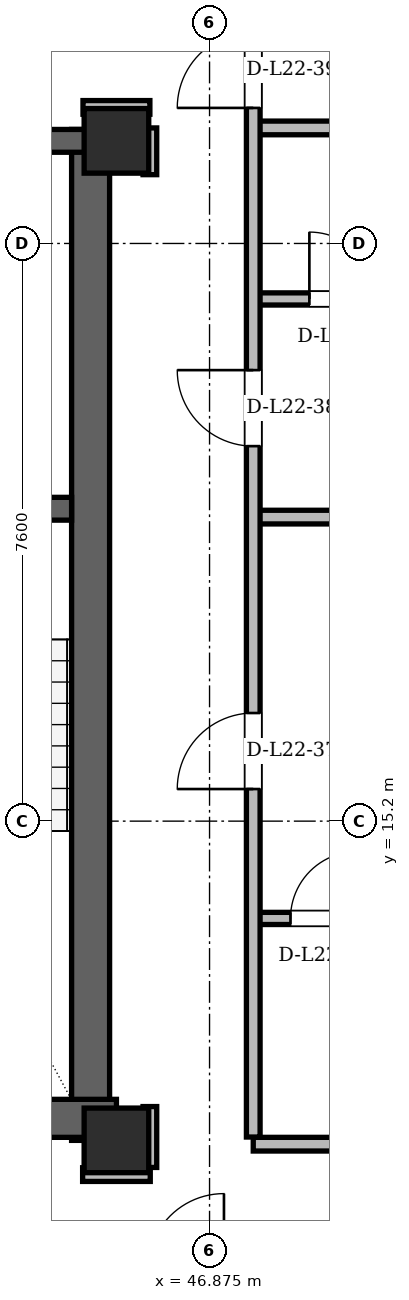
"""IFC4 building model, lengths in metres.
Left out: names, types, materials, properties, quantities, classifications, styles, units other than length and angle.
Written with IfcOpenShell. Run it as: python <this file> out.ifc"""

import sys

from ifc_helpers import new_model, si_unit, direction, frame, frame_2d, origin, origin_2d, place, context, subcontext, project, spatial, rectangle, hollow_rectangle, extrude, element, fill, save


model = new_model("IFC4")
c1 = context("Model", 3, precision=1e-05, world=origin(), true_north=direction((0.0, 1.0)))
c2 = subcontext(c1, "Body", "Model", "MODEL_VIEW")
j1 = project(units=[si_unit("LENGTHUNIT", "METRE"), si_unit("PLANEANGLEUNIT", "RADIAN")], contexts=[c1])
p1 = place(None, origin())
s1 = spatial("IfcSite", under=j1, at=p1, CompositionType="ELEMENT")
p2 = place(p1, origin())
s2 = spatial("IfcBuilding", under=s1, at=p2, CompositionType="ELEMENT")
p3 = place(p2, frame((0.0, 0.0, 86.1)))
s3 = spatial("IfcBuildingStorey", under=s2, at=p3, CompositionType="ELEMENT", Elevation=86.1)
for number, where, z_axis, x_axis in (
    (1, (45.65, 11.0, 0.0), (0.0, 0.0, 1.0), (1.0, 0.0, 0.0)),
    (2, (45.65, 24.15, 0.0), (0.0, 0.0, 1.0), (1.0, 0.0, 0.0)),
):
    element("IfcColumn", number, at=place(p3, frame(where, z_axis=z_axis, x_axis=x_axis)), inside=s3, PredefinedType="COLUMN", context=c2, shape_type="SweptSolid", body=[
        extrude(hollow_rectangle(XDim=0.85, YDim=0.85, WallThickness=0.07, at=origin_2d()), origin(), (0.0, 0.0, 1.0), 3.6),
    ])
p4 = place(p3, frame((45.31, 11.0, 0.0), z_axis=(0.0, 0.0, 1.0), x_axis=(0.0, 1.0, 0.0)))
e3 = element("IfcWall", 3, at=p4, inside=s3, PredefinedType="SHEAR", context=c2, shape_type="SweptSolid", body=[
    extrude(rectangle(XDim=13.3, YDim=0.5, at=frame_2d((6.65, 0.0))), origin(), (0.0, 0.0, 1.0), 3.36),
])
p5 = place(p3, frame((38.55, 11.29, 0.0), z_axis=(0.0, 0.0, 1.0), x_axis=(1.0, 0.0, 0.0)))
e4 = element("IfcWall", 4, at=p5, inside=s3, PredefinedType="SHEAR", context=c2, shape_type="SweptSolid", body=[
    extrude(rectangle(XDim=7.1, YDim=0.5, at=frame_2d((3.55, 0.0))), origin(), (0.0, 0.0, 1.0), 3.36),
])
p6 = place(p3, frame((29.65, 24.15, 0.0), z_axis=(0.0, 0.0, 1.0), x_axis=(1.0, 0.0, 0.0)))
e5 = element("IfcWall", 5, at=p6, inside=s3, PredefinedType="SHEAR", context=c2, shape_type="SweptSolid", body=[
    extrude(rectangle(XDim=15.7, YDim=0.3, at=frame_2d((7.85, 0.0))), origin(), (0.0, 0.0, 1.0), 3.36),
])
p7 = place(p6, frame((1.7, 0.0, 0.0)))
e6 = element("IfcOpeningElement", 6, at=p7, cuts=e5, PredefinedType="OPENING", context=c2, shape_type="SweptSolid", body=[
    extrude(rectangle(XDim=1.2, YDim=2.2, at=frame_2d((0.6, 1.1))), frame((0.0, 0.15, 0.0), z_axis=(0.0, -1.0, 0.0), x_axis=(1.0, 0.0, 0.0)), (0.0, 0.0, 1.0), 0.3),
])
p8 = place(p6, frame((12.8, 0.0, 0.0)))
e7 = element("IfcOpeningElement", 7, at=p8, cuts=e5, PredefinedType="OPENING", context=c2, shape_type="SweptSolid", body=[
    extrude(rectangle(XDim=1.2, YDim=2.2, at=frame_2d((0.6, 1.1))), frame((0.0, 0.15, 0.0), z_axis=(0.0, -1.0, 0.0), x_axis=(1.0, 0.0, 0.0)), (0.0, 0.0, 1.0), 0.3),
])
p9 = place(p6, frame((6.55, 0.0, 0.0)))
e8 = element("IfcOpeningElement", 8, at=p9, cuts=e5, PredefinedType="OPENING", context=c2, shape_type="SweptSolid", body=[
    extrude(rectangle(XDim=0.9, YDim=2.05, at=frame_2d((0.45, 1.025))), frame((0.0, 0.15, 0.0), z_axis=(0.0, -1.0, 0.0), x_axis=(1.0, 0.0, 0.0)), (0.0, 0.0, 1.0), 0.3),
])
p10 = place(p6, frame((8.45, 0.0, 0.0)))
e9 = element("IfcOpeningElement", 9, at=p10, cuts=e5, PredefinedType="OPENING", context=c2, shape_type="SweptSolid", body=[
    extrude(rectangle(XDim=0.9, YDim=2.05, at=frame_2d((0.45, 1.025))), frame((0.0, 0.15, 0.0), z_axis=(0.0, -1.0, 0.0), x_axis=(1.0, 0.0, 0.0)), (0.0, 0.0, 1.0), 0.3),
])
p11 = place(p3, frame((41.05, 19.31, 0.0), z_axis=(0.0, 0.0, 1.0), x_axis=(1.0, 0.0, 0.0)))
e10 = element("IfcWall", 10, at=p11, inside=s3, PredefinedType="SHEAR", context=c2, shape_type="SweptSolid", body=[
    extrude(rectangle(XDim=4.01, YDim=0.3, at=frame_2d((2.005, 0.0))), origin(), (0.0, 0.0, 1.0), 3.36),
])
p12 = place(p11, frame((1.6, 0.0, 0.0)))
e11 = element("IfcOpeningElement", 11, at=p12, cuts=e10, PredefinedType="OPENING", context=c2, shape_type="SweptSolid", body=[
    extrude(rectangle(XDim=1.4, YDim=2.2, at=frame_2d((0.7, 1.1))), frame((0.0, 0.15, 0.0), z_axis=(0.0, -1.0, 0.0), x_axis=(1.0, 0.0, 0.0)), (0.0, 0.0, 1.0), 0.3),
])
p13 = place(p3, frame((60.917, 13.879, 0.0), z_axis=(0.0, 0.0, 1.0), x_axis=(-0.49999956034, 0.866025657622, 0.0)))
e12 = element("IfcWall", 12, at=p13, inside=s3, PredefinedType="SOLIDWALL", context=c2, shape_type="SweptSolid", body=[
    extrude(rectangle(XDim=34.192, YDim=0.34, at=frame_2d((17.096, 0.0))), origin(), (0.0, 0.0, 1.0), 2.578),
])
p14 = place(p13, frame((6.579, 0.0, 0.0)))
e13 = element("IfcOpeningElement", 13, at=p14, cuts=e12, PredefinedType="OPENING", context=c2, shape_type="SweptSolid", body=[
    extrude(rectangle(XDim=1.5, YDim=2.2, at=frame_2d((0.75, 1.1))), frame((0.0, 0.17, 0.0), z_axis=(0.0, -1.0, 0.0), x_axis=(1.0, 0.0, 0.0)), (0.0, 0.0, 1.0), 0.34),
])
p15 = place(p13, frame((24.868, 0.0, 0.0)))
e14 = element("IfcOpeningElement", 14, at=p15, cuts=e12, PredefinedType="OPENING", context=c2, shape_type="SweptSolid", body=[
    extrude(rectangle(XDim=1.5, YDim=2.2, at=frame_2d((0.75, 1.1))), frame((0.0, 0.17, 0.0), z_axis=(0.0, -1.0, 0.0), x_axis=(1.0, 0.0, 0.0)), (0.0, 0.0, 1.0), 0.34),
])
p16 = place(p13, frame((1.584, 0.0, 0.85)))
e15 = element("IfcOpeningElement", 15, at=p16, cuts=e12, PredefinedType="OPENING", context=c2, shape_type="SweptSolid", body=[
    extrude(rectangle(XDim=1.2, YDim=1.48, at=frame_2d((0.6, 0.74))), frame((0.0, 0.17, 0.0), z_axis=(0.0, -1.0, 0.0), x_axis=(1.0, 0.0, 0.0)), (0.0, 0.0, 1.0), 0.34),
])
p17 = place(p13, frame((30.611, 0.0, 0.85)))
e16 = element("IfcOpeningElement", 16, at=p17, cuts=e12, PredefinedType="OPENING", context=c2, shape_type="SweptSolid", body=[
    extrude(rectangle(XDim=2.5, YDim=1.618, at=frame_2d((1.25, 0.809))), frame((0.0, 0.17, 0.0), z_axis=(0.0, -1.0, 0.0), x_axis=(1.0, 0.0, 0.0)), (0.0, 0.0, 1.0), 0.34),
])
p18 = place(p13, frame((20.17, 0.0, 0.85)))
e17 = element("IfcOpeningElement", 17, at=p18, cuts=e12, PredefinedType="OPENING", context=c2, shape_type="SweptSolid", body=[
    extrude(rectangle(XDim=2.4, YDim=1.618, at=frame_2d((1.2, 0.809))), frame((0.0, 0.17, 0.0), z_axis=(0.0, -1.0, 0.0), x_axis=(1.0, 0.0, 0.0)), (0.0, 0.0, 1.0), 0.34),
])
p19 = place(p13, frame((26.841, 0.0, 0.85)))
e18 = element("IfcOpeningElement", 18, at=p19, cuts=e12, PredefinedType="OPENING", context=c2, shape_type="SweptSolid", body=[
    extrude(rectangle(XDim=1.2, YDim=1.48, at=frame_2d((0.6, 0.74))), frame((0.0, 0.17, 0.0), z_axis=(0.0, -1.0, 0.0), x_axis=(1.0, 0.0, 0.0)), (0.0, 0.0, 1.0), 0.34),
])
p20 = place(p13, frame((15.279, 0.0, 0.85)))
e19 = element("IfcOpeningElement", 19, at=p20, cuts=e12, PredefinedType="OPENING", context=c2, shape_type="SweptSolid", body=[
    extrude(rectangle(XDim=1.2, YDim=1.48, at=frame_2d((0.6, 0.74))), frame((0.0, 0.17, 0.0), z_axis=(0.0, -1.0, 0.0), x_axis=(1.0, 0.0, 0.0)), (0.0, 0.0, 1.0), 0.34),
])
p21 = place(p13, frame((17.873, 0.0, 0.85)))
e20 = element("IfcOpeningElement", 20, at=p21, cuts=e12, PredefinedType="OPENING", context=c2, shape_type="SweptSolid", body=[
    extrude(rectangle(XDim=1.2, YDim=1.48, at=frame_2d((0.6, 0.74))), frame((0.0, 0.17, 0.0), z_axis=(0.0, -1.0, 0.0), x_axis=(1.0, 0.0, 0.0)), (0.0, 0.0, 1.0), 0.34),
])
p22 = place(p3, frame((45.205, 10.55, 0.0), z_axis=(0.0, 0.0, 1.0), x_axis=(1.0, 0.0, 0.0)))
e21 = element("IfcWall", 21, at=p22, inside=s3, PredefinedType="PARTITIONING", context=c2, shape_type="SweptSolid", body=[
    extrude(rectangle(XDim=0.89, YDim=0.18, at=frame_2d((0.445, 0.0))), origin(), (0.0, 0.0, 1.0), 3.36),
])
p23 = place(p3, frame((47.45, 10.95, 0.0), z_axis=(0.0, 0.0, 1.0), x_axis=(1.0, 0.0, 0.0)))
e22 = element("IfcWall", 22, at=p23, inside=s3, PredefinedType="PARTITIONING", context=c2, shape_type="SweptSolid", body=[
    extrude(rectangle(XDim=11.575, YDim=0.18, at=frame_2d((5.788, 0.0))), origin(), (0.0, 0.0, 1.0), 3.36),
])
p24 = place(p3, frame((47.4, 13.92, 0.0), z_axis=(0.0, 0.0, 1.0), x_axis=(1.0, 0.0, 0.0)))
e23 = element("IfcWall", 23, at=p24, inside=s3, PredefinedType="PARTITIONING", context=c2, shape_type="SweptSolid", body=[
    extrude(rectangle(XDim=13.124, YDim=0.16, at=frame_2d((6.562, 0.0))), origin(), (0.0, 0.0, 1.0), 3.36),
])
p25 = place(p24, frame((0.54, 0.0, 0.0)))
e24 = element("IfcOpeningElement", 24, at=p25, cuts=e23, PredefinedType="OPENING", context=c2, shape_type="SweptSolid", body=[
    extrude(rectangle(XDim=0.88, YDim=2.08, at=frame_2d((0.44, 1.04))), frame((0.0, 0.08, 0.0), z_axis=(0.0, -1.0, 0.0), x_axis=(1.0, 0.0, 0.0)), (0.0, 0.0, 1.0), 0.16),
])
p26 = place(p24, frame((2.967, 0.0, 0.0)))
e25 = element("IfcOpeningElement", 25, at=p26, cuts=e23, PredefinedType="OPENING", context=c2, shape_type="SweptSolid", body=[
    extrude(rectangle(XDim=0.95, YDim=2.1, at=frame_2d((0.475, 1.05))), frame((0.0, 0.08, 0.0), z_axis=(0.0, -1.0, 0.0), x_axis=(1.0, 0.0, 0.0)), (0.0, 0.0, 1.0), 0.16),
])
p27 = place(p24, frame((5.604, 0.0, 0.0)))
e26 = element("IfcOpeningElement", 26, at=p27, cuts=e23, PredefinedType="OPENING", context=c2, shape_type="SweptSolid", body=[
    extrude(rectangle(XDim=0.95, YDim=2.1, at=frame_2d((0.475, 1.05))), frame((0.0, 0.08, 0.0), z_axis=(0.0, -1.0, 0.0), x_axis=(1.0, 0.0, 0.0)), (0.0, 0.0, 1.0), 0.16),
])
p28 = place(p24, frame((8.225, 0.0, 0.0)))
e27 = element("IfcOpeningElement", 27, at=p28, cuts=e23, PredefinedType="OPENING", context=c2, shape_type="SweptSolid", body=[
    extrude(rectangle(XDim=0.92, YDim=2.12, at=frame_2d((0.46, 1.06))), frame((0.0, 0.08, 0.0), z_axis=(0.0, -1.0, 0.0), x_axis=(1.0, 0.0, 0.0)), (0.0, 0.0, 1.0), 0.16),
])
p29 = place(p24, frame((10.79, 0.0, 0.0)))
e28 = element("IfcOpeningElement", 28, at=p29, cuts=e23, PredefinedType="OPENING", context=c2, shape_type="SweptSolid", body=[
    extrude(rectangle(XDim=0.95, YDim=2.1, at=frame_2d((0.475, 1.05))), frame((0.0, 0.08, 0.0), z_axis=(0.0, -1.0, 0.0), x_axis=(1.0, 0.0, 0.0)), (0.0, 0.0, 1.0), 0.16),
])
p30 = place(p3, frame((47.45, 19.2, 0.0), z_axis=(0.0, 0.0, 1.0), x_axis=(1.0, 0.0, 0.0)))
e29 = element("IfcWall", 29, at=p30, inside=s3, PredefinedType="PARTITIONING", context=c2, shape_type="SweptSolid", body=[
    extrude(rectangle(XDim=10.195, YDim=0.18, at=frame_2d((5.097, 0.0))), origin(), (0.0, 0.0, 1.0), 3.36),
])
p31 = place(p3, frame((47.4, 22.07, 0.0), z_axis=(0.0, 0.0, 1.0), x_axis=(1.0, 0.0, 0.0)))
e30 = element("IfcWall", 30, at=p31, inside=s3, PredefinedType="PARTITIONING", context=c2, shape_type="SweptSolid", body=[
    extrude(rectangle(XDim=8.588, YDim=0.16, at=frame_2d((4.294, 0.0))), origin(), (0.0, 0.0, 1.0), 3.36),
])
p32 = place(p31, frame((0.789, 0.0, 0.0)))
e31 = element("IfcOpeningElement", 31, at=p32, cuts=e30, PredefinedType="OPENING", context=c2, shape_type="SweptSolid", body=[
    extrude(rectangle(XDim=0.88, YDim=2.08, at=frame_2d((0.44, 1.04))), frame((0.0, 0.08, 0.0), z_axis=(0.0, -1.0, 0.0), x_axis=(1.0, 0.0, 0.0)), (0.0, 0.0, 1.0), 0.16),
])
p33 = place(p31, frame((3.487, 0.0, 0.0)))
e32 = element("IfcOpeningElement", 32, at=p33, cuts=e30, PredefinedType="OPENING", context=c2, shape_type="SweptSolid", body=[
    extrude(rectangle(XDim=0.95, YDim=2.1, at=frame_2d((0.475, 1.05))), frame((0.0, 0.08, 0.0), z_axis=(0.0, -1.0, 0.0), x_axis=(1.0, 0.0, 0.0)), (0.0, 0.0, 1.0), 0.16),
])
p34 = place(p31, frame((6.112, 0.0, 0.0)))
e33 = element("IfcOpeningElement", 33, at=p34, cuts=e30, PredefinedType="OPENING", context=c2, shape_type="SweptSolid", body=[
    extrude(rectangle(XDim=0.95, YDim=2.1, at=frame_2d((0.475, 1.05))), frame((0.0, 0.08, 0.0), z_axis=(0.0, -1.0, 0.0), x_axis=(1.0, 0.0, 0.0)), (0.0, 0.0, 1.0), 0.16),
])
p35 = place(p3, frame((47.45, 24.32, 0.0), z_axis=(0.0, 0.0, 1.0), x_axis=(1.0, 0.0, 0.0)))
e34 = element("IfcWall", 34, at=p35, inside=s3, PredefinedType="PARTITIONING", context=c2, shape_type="SweptSolid", body=[
    extrude(rectangle(XDim=7.239, YDim=0.18, at=frame_2d((3.619, 0.0))), origin(), (0.0, 0.0, 1.0), 3.36),
])
p36 = place(p3, frame((45.21, 24.59, 0.0), z_axis=(0.0, 0.0, 1.0), x_axis=(1.0, 0.0, 0.0)))
e35 = element("IfcWall", 35, at=p36, inside=s3, PredefinedType="PARTITIONING", context=c2, shape_type="SweptSolid", body=[
    extrude(rectangle(XDim=0.88, YDim=0.18, at=frame_2d((0.44, 0.0))), origin(), (0.0, 0.0, 1.0), 2.814),
])
p37 = place(p3, frame((46.09, 10.644, 0.0), z_axis=(0.0, 0.0, 1.0), x_axis=(0.0, 1.0, 0.0)))
e36 = element("IfcWall", 36, at=p37, inside=s3, PredefinedType="PARTITIONING", context=c2, shape_type="SweptSolid", body=[
    extrude(rectangle(XDim=0.801, YDim=0.18, at=frame_2d((0.4, 0.0))), origin(), (0.0, 0.0, 1.0), 2.814),
])
p38 = place(p3, frame((46.09, 23.705, 0.0), z_axis=(0.0, 0.0, 1.0), x_axis=(0.0, 1.0, 0.0)))
e37 = element("IfcWall", 37, at=p38, inside=s3, PredefinedType="PARTITIONING", context=c2, shape_type="SweptSolid", body=[
    extrude(rectangle(XDim=0.615, YDim=0.18, at=frame_2d((0.308, 0.0))), origin(), (0.0, 0.0, 1.0), 2.946),
])
p39 = place(p3, frame((47.45, 11.044, 0.0), z_axis=(0.0, 0.0, 1.0), x_axis=(0.0, 1.0, 0.0)))
e38 = element("IfcWall", 38, at=p39, inside=s3, PredefinedType="PARTITIONING", context=c2, shape_type="SweptSolid", body=[
    extrude(rectangle(XDim=14.832, YDim=0.18, at=frame_2d((7.416, 0.0))), origin(), (0.0, 0.0, 1.0), 2.814),
])
p40 = place(p39, frame((4.578, 0.0, 0.0)))
e39 = element("IfcOpeningElement", 39, at=p40, cuts=e38, PredefinedType="OPENING", context=c2, shape_type="SweptSolid", body=[
    extrude(rectangle(XDim=1.0, YDim=2.18, at=frame_2d((0.5, 1.09))), frame((0.0, 0.09, 0.0), z_axis=(0.0, -1.0, 0.0), x_axis=(1.0, 0.0, 0.0)), (0.0, 0.0, 1.0), 0.18),
])
p41 = place(p39, frame((9.09, 0.0, 0.0)))
e40 = element("IfcOpeningElement", 40, at=p41, cuts=e38, PredefinedType="OPENING", context=c2, shape_type="SweptSolid", body=[
    extrude(rectangle(XDim=1.0, YDim=2.18, at=frame_2d((0.5, 1.09))), frame((0.0, 0.09, 0.0), z_axis=(0.0, -1.0, 0.0), x_axis=(1.0, 0.0, 0.0)), (0.0, 0.0, 1.0), 0.18),
])
p42 = place(p39, frame((13.539, 0.0, 0.0)))
e41 = element("IfcOpeningElement", 41, at=p42, cuts=e38, PredefinedType="OPENING", context=c2, shape_type="SweptSolid", body=[
    extrude(rectangle(XDim=1.0, YDim=2.18, at=frame_2d((0.5, 1.09))), frame((0.0, 0.09, 0.0), z_axis=(0.0, -1.0, 0.0), x_axis=(1.0, 0.0, 0.0)), (0.0, 0.0, 1.0), 0.18),
])
p43 = place(p25, origin())
e42 = element("IfcDoor", 42, at=p43, inside=s3, OperationType="SINGLE_SWING_RIGHT", PredefinedType="DOOR", context=c2, shape_type="SweptSolid", body=[
    extrude(rectangle(XDim=0.88, YDim=2.08, at=frame_2d((0.44, 1.04))), frame((0.0, 0.025, 0.0), z_axis=(0.0, -1.0, 0.0), x_axis=(1.0, 0.0, 0.0)), (0.0, 0.0, 1.0), 0.05),
])
fill(e24, e42)
p44 = place(p32, origin())
e43 = element("IfcDoor", 43, at=p44, inside=s3, OperationType="SINGLE_SWING_LEFT", PredefinedType="DOOR", context=c2, shape_type="SweptSolid", body=[
    extrude(rectangle(XDim=0.88, YDim=2.08, at=frame_2d((0.44, 1.04))), frame((0.0, 0.025, 0.0), z_axis=(0.0, -1.0, 0.0), x_axis=(1.0, 0.0, 0.0)), (0.0, 0.0, 1.0), 0.05),
])
fill(e31, e43)
p45 = place(p40, origin())
e44 = element("IfcDoor", 44, at=p45, inside=s3, OperationType="SINGLE_SWING_LEFT", PredefinedType="DOOR", context=c2, shape_type="SweptSolid", body=[
    extrude(rectangle(XDim=1.0, YDim=2.18, at=frame_2d((0.5, 1.09))), frame((0.0, 0.025, 0.0), z_axis=(0.0, -1.0, 0.0), x_axis=(1.0, 0.0, 0.0)), (0.0, 0.0, 1.0), 0.05),
])
fill(e39, e44)
p46 = place(p41, origin())
e45 = element("IfcDoor", 45, at=p46, inside=s3, OperationType="SINGLE_SWING_RIGHT", PredefinedType="DOOR", context=c2, shape_type="SweptSolid", body=[
    extrude(rectangle(XDim=1.0, YDim=2.18, at=frame_2d((0.5, 1.09))), frame((0.0, 0.025, 0.0), z_axis=(0.0, -1.0, 0.0), x_axis=(1.0, 0.0, 0.0)), (0.0, 0.0, 1.0), 0.05),
])
fill(e40, e45)
p47 = place(p42, origin())
e46 = element("IfcDoor", 46, at=p47, inside=s3, OperationType="SINGLE_SWING_LEFT", PredefinedType="DOOR", context=c2, shape_type="SweptSolid", body=[
    extrude(rectangle(XDim=1.0, YDim=2.18, at=frame_2d((0.5, 1.09))), frame((0.0, 0.025, 0.0), z_axis=(0.0, -1.0, 0.0), x_axis=(1.0, 0.0, 0.0)), (0.0, 0.0, 1.0), 0.05),
])
fill(e41, e46)
save(model, sys.argv[1])
